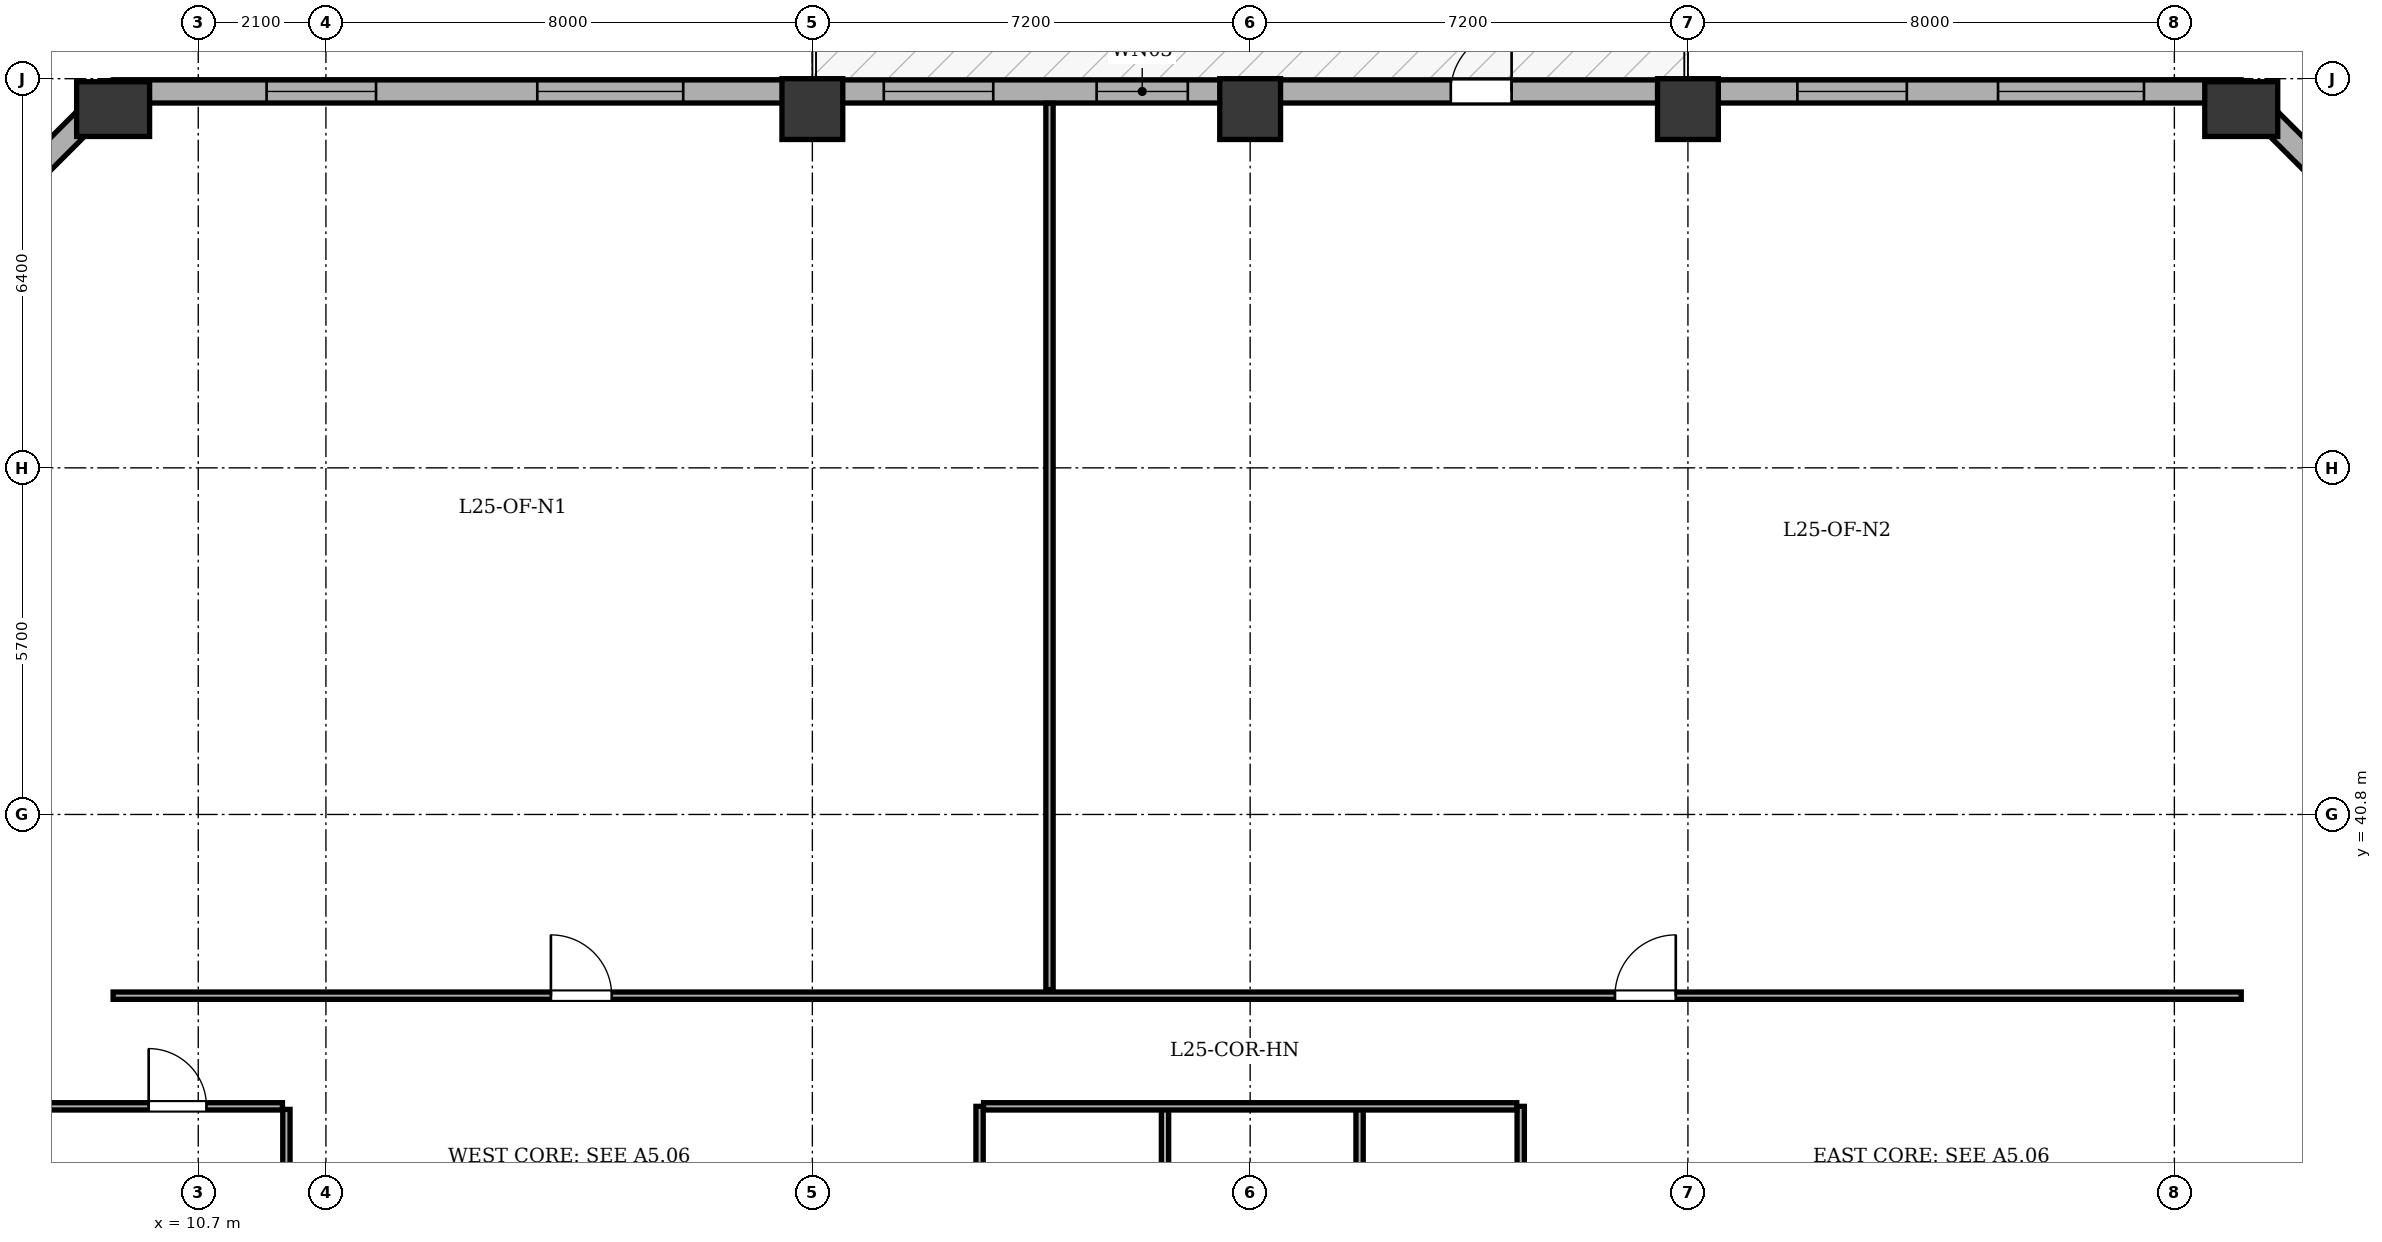
"""IFC4 building model, lengths in metres.
Left out: names, types, materials, properties, quantities, classifications, styles, units other than length and angle.
Written with IfcOpenShell. Run it as: python <this file> out.ifc"""

import sys

from ifc_helpers import new_model, si_unit, direction, frame, frame_2d, origin, origin_2d, place, context, subcontext, project, spatial, rectangle, extrude, element, fill, save


model = new_model("IFC4")
c1 = context("Model", 3, precision=1e-05, world=origin(), true_north=direction((0.0, 1.0)))
c2 = subcontext(c1, "Body", "Model", "MODEL_VIEW")
j1 = project(units=[si_unit("LENGTHUNIT", "METRE"), si_unit("PLANEANGLEUNIT", "RADIAN")], contexts=[c1])
p1 = place(None, origin())
s1 = spatial("IfcSite", under=j1, at=p1, CompositionType="ELEMENT")
p2 = place(p1, origin())
s2 = spatial("IfcBuilding", under=s1, at=p2, CompositionType="ELEMENT")
p3 = place(p2, frame((0.0, 0.0, 102.3)))
s3 = spatial("IfcBuildingStorey", under=s2, at=p3, CompositionType="ELEMENT", Elevation=102.3)
p4 = place(p3, frame((9.3, 52.4, 0.0), z_axis=(0.0, 0.0, 1.0), x_axis=(1.0, 0.0, 0.0)))
e1 = element("IfcColumn", 1, at=p4, inside=s3, PredefinedType="COLUMN", context=c2, shape_type="SweptSolid", body=[
    extrude(rectangle(XDim=0.9, YDim=1.2, at=origin_2d()), origin(), (0.0, 0.0, 1.0), 3.9),
])
for number, where, z_axis, x_axis in (
    (2, (20.8, 52.4, 0.0), (0.0, 0.0, 1.0), (1.0, 0.0, 0.0)),
    (3, (28.0, 52.4, 0.0), (0.0, 0.0, 1.0), (1.0, 0.0, 0.0)),
    (4, (35.2, 52.4, 0.0), (0.0, 0.0, 1.0), (1.0, 0.0, 0.0)),
):
    element("IfcColumn", number, at=place(p3, frame(where, z_axis=z_axis, x_axis=x_axis)), inside=s3, PredefinedType="COLUMN", context=c2, shape_type="SweptSolid", body=[
        extrude(rectangle(XDim=1.0, YDim=1.0, at=origin_2d()), origin(), (0.0, 0.0, 1.0), 3.9),
    ])
p5 = place(p3, frame((44.3, 52.4, 0.0), z_axis=(0.0, 0.0, 1.0), x_axis=(1.0, 0.0, 0.0)))
e5 = element("IfcColumn", 5, at=p5, inside=s3, PredefinedType="COLUMN", context=c2, shape_type="SweptSolid", body=[
    extrude(rectangle(XDim=0.9, YDim=1.2, at=origin_2d()), origin(), (0.0, 0.0, 1.0), 3.9),
])
p6 = place(p3, frame((4.51, 47.9, 0.0), z_axis=(0.0, 0.0, 1.0), x_axis=(0.707106781187, 0.707106781187, 0.0)))
e6 = element("IfcWall", 6, at=p6, inside=s3, PredefinedType="STANDARD", context=c2, shape_type="SweptSolid", body=[
    extrude(rectangle(XDim=6.774, YDim=0.38, at=frame_2d((3.387, 0.0))), origin(), (0.0, 0.0, 1.0), 3.135),
])
p7 = place(p6, frame((2.687, 0.0, 0.8)))
e7 = element("IfcOpeningElement", 7, at=p7, cuts=e6, PredefinedType="OPENING", context=c2, shape_type="SweptSolid", body=[
    extrude(rectangle(XDim=1.4, YDim=1.65, at=frame_2d((0.7, 0.825))), frame((0.0, 0.2, 0.0), z_axis=(0.0, -1.0, 0.0), x_axis=(1.0, 0.0, 0.0)), (0.0, 0.0, 1.0), 0.4),
])
p8 = place(p3, frame((9.3, 52.69, 0.0), z_axis=(0.0, 0.0, 1.0), x_axis=(1.0, 0.0, 0.0)))
e8 = element("IfcWall", 8, at=p8, inside=s3, PredefinedType="STANDARD", context=c2, shape_type="SweptSolid", body=[
    extrude(rectangle(XDim=35.0, YDim=0.38, at=frame_2d((17.5, 0.0))), origin(), (0.0, 0.0, 1.0), 3.135),
])
p9 = place(p8, frame((22.0, 0.0, 0.0)))
e9 = element("IfcOpeningElement", 9, at=p9, cuts=e8, PredefinedType="OPENING", context=c2, shape_type="SweptSolid", body=[
    extrude(rectangle(XDim=1.0, YDim=2.02, at=frame_2d((0.5, 1.01))), frame((0.0, 0.2, 0.0), z_axis=(0.0, -1.0, 0.0), x_axis=(1.0, 0.0, 0.0)), (0.0, 0.0, 1.0), 0.4),
])
p10 = place(p8, frame((2.524, 0.0, 0.8)))
e10 = element("IfcOpeningElement", 10, at=p10, cuts=e8, PredefinedType="OPENING", context=c2, shape_type="SweptSolid", body=[
    extrude(rectangle(XDim=1.8, YDim=1.9, at=frame_2d((0.9, 0.95))), frame((0.0, 0.2, 0.0), z_axis=(0.0, -1.0, 0.0), x_axis=(1.0, 0.0, 0.0)), (0.0, 0.0, 1.0), 0.4),
])
p11 = place(p8, frame((6.976, 0.0, 0.8)))
e11 = element("IfcOpeningElement", 11, at=p11, cuts=e8, PredefinedType="OPENING", context=c2, shape_type="SweptSolid", body=[
    extrude(rectangle(XDim=2.4, YDim=1.9, at=frame_2d((1.2, 0.95))), frame((0.0, 0.2, 0.0), z_axis=(0.0, -1.0, 0.0), x_axis=(1.0, 0.0, 0.0)), (0.0, 0.0, 1.0), 0.4),
])
p12 = place(p8, frame((12.675, 0.0, 0.8)))
e12 = element("IfcOpeningElement", 12, at=p12, cuts=e8, PredefinedType="OPENING", context=c2, shape_type="SweptSolid", body=[
    extrude(rectangle(XDim=1.8, YDim=1.9, at=frame_2d((0.9, 0.95))), frame((0.0, 0.2, 0.0), z_axis=(0.0, -1.0, 0.0), x_axis=(1.0, 0.0, 0.0)), (0.0, 0.0, 1.0), 0.4),
])
p13 = place(p8, frame((16.175, 0.0, 0.8)))
e13 = element("IfcOpeningElement", 13, at=p13, cuts=e8, PredefinedType="OPENING", context=c2, shape_type="SweptSolid", body=[
    extrude(rectangle(XDim=1.5, YDim=1.9, at=frame_2d((0.75, 0.95))), frame((0.0, 0.2, 0.0), z_axis=(0.0, -1.0, 0.0), x_axis=(1.0, 0.0, 0.0)), (0.0, 0.0, 1.0), 0.4),
])
p14 = place(p8, frame((27.7, 0.0, 0.8)))
e14 = element("IfcOpeningElement", 14, at=p14, cuts=e8, PredefinedType="OPENING", context=c2, shape_type="SweptSolid", body=[
    extrude(rectangle(XDim=1.8, YDim=1.9, at=frame_2d((0.9, 0.95))), frame((0.0, 0.2, 0.0), z_axis=(0.0, -1.0, 0.0), x_axis=(1.0, 0.0, 0.0)), (0.0, 0.0, 1.0), 0.4),
])
p15 = place(p8, frame((31.0, 0.0, 0.8)))
e15 = element("IfcOpeningElement", 15, at=p15, cuts=e8, PredefinedType="OPENING", context=c2, shape_type="SweptSolid", body=[
    extrude(rectangle(XDim=2.4, YDim=1.9, at=frame_2d((1.2, 0.95))), frame((0.0, 0.2, 0.0), z_axis=(0.0, -1.0, 0.0), x_axis=(1.0, 0.0, 0.0)), (0.0, 0.0, 1.0), 0.4),
])
p16 = place(p3, frame((44.3, 52.69, 0.0), z_axis=(0.0, 0.0, 1.0), x_axis=(0.707106781187, -0.707106781187, 0.0)))
e16 = element("IfcWall", 16, at=p16, inside=s3, PredefinedType="STANDARD", context=c2, shape_type="SweptSolid", body=[
    extrude(rectangle(XDim=6.774, YDim=0.38, at=frame_2d((3.387, 0.0))), origin(), (0.0, 0.0, 1.0), 3.135),
])
p17 = place(p16, frame((2.687, 0.0, 0.8)))
e17 = element("IfcOpeningElement", 17, at=p17, cuts=e16, PredefinedType="OPENING", context=c2, shape_type="SweptSolid", body=[
    extrude(rectangle(XDim=1.4, YDim=1.65, at=frame_2d((0.7, 0.825))), frame((0.0, 0.2, 0.0), z_axis=(0.0, -1.0, 0.0), x_axis=(1.0, 0.0, 0.0)), (0.0, 0.0, 1.0), 0.4),
])
for number, where, z_axis, x_axis in (
    (18, (23.55, 24.715, 0.0), (0.0, 0.0, 1.0), (0.0, 1.0, 0.0)),
    (19, (32.45, 24.715, 0.0), (0.0, 0.0, 1.0), (0.0, 1.0, 0.0)),
    (20, (26.6, 24.715, 0.0), (0.0, 0.0, 1.0), (0.0, 1.0, 0.0)),
):
    element("IfcWall", number, at=place(p3, frame(where, z_axis=z_axis, x_axis=x_axis)), inside=s3, PredefinedType="PARTITIONING", context=c2, shape_type="SweptSolid", body=[
        extrude(rectangle(XDim=11.285, YDim=0.12, at=frame_2d((5.643, 0.0))), origin(), (0.0, 0.0, 1.0), 3.6),
    ])
p18 = place(p3, frame((29.8, 24.715, 0.0), z_axis=(0.0, 0.0, 1.0), x_axis=(0.0, 1.0, 0.0)))
e21 = element("IfcWall", 21, at=p18, inside=s3, PredefinedType="PARTITIONING", context=c2, shape_type="SweptSolid", body=[
    extrude(rectangle(XDim=11.285, YDim=0.12, at=frame_2d((5.643, 0.0))), origin(), (0.0, 0.0, 1.0), 3.135),
])
p19 = place(p3, frame((23.615, 36.0, 0.0), z_axis=(0.0, 0.0, 1.0), x_axis=(1.0, 0.0, 0.0)))
e22 = element("IfcWall", 22, at=p19, inside=s3, PredefinedType="PARTITIONING", context=c2, shape_type="SweptSolid", body=[
    extrude(rectangle(XDim=8.77, YDim=0.12, at=frame_2d((4.385, 0.0))), origin(), (0.0, 0.0, 1.0), 3.6),
])
p20 = place(p3, frame((9.3, 37.82, 0.0), z_axis=(0.0, 0.0, 1.0), x_axis=(1.0, 0.0, 0.0)))
e23 = element("IfcWall", 23, at=p20, inside=s3, PredefinedType="PARTITIONING", context=c2, shape_type="SweptSolid", body=[
    extrude(rectangle(XDim=35.0, YDim=0.12, at=frame_2d((17.5, 0.0))), origin(), (0.0, 0.0, 1.0), 3.6),
])
p21 = place(p20, frame((7.2, 0.0, 0.0)))
e24 = element("IfcOpeningElement", 24, at=p21, cuts=e23, PredefinedType="OPENING", context=c2, shape_type="SweptSolid", body=[
    extrude(rectangle(XDim=1.0, YDim=2.1, at=frame_2d((0.5, 1.05))), frame((0.0, 0.07, 0.0), z_axis=(0.0, -1.0, 0.0), x_axis=(1.0, 0.0, 0.0)), (0.0, 0.0, 1.0), 0.14),
])
p22 = place(p20, frame((24.7, 0.0, 0.0)))
e25 = element("IfcOpeningElement", 25, at=p22, cuts=e23, PredefinedType="OPENING", context=c2, shape_type="SweptSolid", body=[
    extrude(rectangle(XDim=1.0, YDim=2.1, at=frame_2d((0.5, 1.05))), frame((0.0, 0.07, 0.0), z_axis=(0.0, -1.0, 0.0), x_axis=(1.0, 0.0, 0.0)), (0.0, 0.0, 1.0), 0.14),
])
p23 = place(p3, frame((24.7, 37.92, 0.0), z_axis=(0.0, 0.0, 1.0), x_axis=(0.0, 1.0, 0.0)))
e26 = element("IfcWall", 26, at=p23, inside=s3, PredefinedType="PARTITIONING", context=c2, shape_type="SweptSolid", body=[
    extrude(rectangle(XDim=14.575, YDim=0.12, at=frame_2d((7.288, 0.0))), origin(), (0.0, 0.0, 1.0), 3.6),
])
p24 = place(p3, frame((12.15, 18.45, 0.0), z_axis=(0.0, 0.0, 1.0), x_axis=(0.0, 1.0, 0.0)))
e27 = element("IfcWall", 27, at=p24, inside=s3, PredefinedType="PARTITIONING", context=c2, shape_type="SweptSolid", body=[
    extrude(rectangle(XDim=17.5, YDim=0.12, at=frame_2d((8.75, 0.0))), origin(), (0.0, 0.0, 1.0), 3.6),
])
p25 = place(p3, frame((4.705, 36.0, 0.0), z_axis=(0.0, 0.0, 1.0), x_axis=(1.0, 0.0, 0.0)))
e28 = element("IfcWall", 28, at=p25, inside=s3, PredefinedType="PARTITIONING", context=c2, shape_type="SweptSolid", body=[
    extrude(rectangle(XDim=7.38, YDim=0.12, at=frame_2d((3.69, 0.0))), origin(), (0.0, 0.0, 1.0), 3.6),
])
p26 = place(p25, frame((5.18, 0.0, 0.0)))
e29 = element("IfcOpeningElement", 29, at=p26, cuts=e28, PredefinedType="OPENING", context=c2, shape_type="SweptSolid", body=[
    extrude(rectangle(XDim=0.95, YDim=2.1, at=frame_2d((0.475, 1.05))), frame((0.0, 0.07, 0.0), z_axis=(0.0, -1.0, 0.0), x_axis=(1.0, 0.0, 0.0)), (0.0, 0.0, 1.0), 0.14),
])
p27 = place(p9, origin())
e30 = element("IfcDoor", 30, at=p27, inside=s3, OperationType="SINGLE_SWING_RIGHT", PredefinedType="DOOR", context=c2, shape_type="SweptSolid", body=[
    extrude(rectangle(XDim=1.0, YDim=2.02, at=frame_2d((0.5, 1.01))), frame((0.0, 0.025, 0.0), z_axis=(0.0, -1.0, 0.0), x_axis=(1.0, 0.0, 0.0)), (0.0, 0.0, 1.0), 0.05),
])
fill(e9, e30)
p28 = place(p10, origin())
e31 = element("IfcWindow", 31, at=p28, inside=s3, PartitioningType="SINGLE_PANEL", PredefinedType="WINDOW", context=c2, shape_type="SweptSolid", body=[
    extrude(rectangle(XDim=1.8, YDim=1.9, at=frame_2d((0.9, 0.95))), frame((0.0, -0.01, 0.0), z_axis=(0.0, -1.0, 0.0), x_axis=(1.0, 0.0, 0.0)), (0.0, 0.0, 1.0), 0.06),
])
fill(e10, e31)
p29 = place(p11, origin())
e32 = element("IfcWindow", 32, at=p29, inside=s3, PartitioningType="SINGLE_PANEL", PredefinedType="WINDOW", context=c2, shape_type="SweptSolid", body=[
    extrude(rectangle(XDim=2.4, YDim=1.9, at=frame_2d((1.2, 0.95))), frame((0.0, -0.01, 0.0), z_axis=(0.0, -1.0, 0.0), x_axis=(1.0, 0.0, 0.0)), (0.0, 0.0, 1.0), 0.06),
])
fill(e11, e32)
p30 = place(p12, origin())
e33 = element("IfcWindow", 33, at=p30, inside=s3, PartitioningType="SINGLE_PANEL", PredefinedType="WINDOW", context=c2, shape_type="SweptSolid", body=[
    extrude(rectangle(XDim=1.8, YDim=1.9, at=frame_2d((0.9, 0.95))), frame((0.0, -0.01, 0.0), z_axis=(0.0, -1.0, 0.0), x_axis=(1.0, 0.0, 0.0)), (0.0, 0.0, 1.0), 0.06),
])
fill(e12, e33)
p31 = place(p13, origin())
e34 = element("IfcWindow", 34, at=p31, inside=s3, PartitioningType="SINGLE_PANEL", PredefinedType="WINDOW", context=c2, shape_type="SweptSolid", body=[
    extrude(rectangle(XDim=1.5, YDim=1.9, at=frame_2d((0.75, 0.95))), frame((0.0, -0.01, 0.0), z_axis=(0.0, -1.0, 0.0), x_axis=(1.0, 0.0, 0.0)), (0.0, 0.0, 1.0), 0.06),
])
fill(e13, e34)
p32 = place(p14, origin())
e35 = element("IfcWindow", 35, at=p32, inside=s3, PartitioningType="SINGLE_PANEL", PredefinedType="WINDOW", context=c2, shape_type="SweptSolid", body=[
    extrude(rectangle(XDim=1.8, YDim=1.9, at=frame_2d((0.9, 0.95))), frame((0.0, -0.01, 0.0), z_axis=(0.0, -1.0, 0.0), x_axis=(1.0, 0.0, 0.0)), (0.0, 0.0, 1.0), 0.06),
])
fill(e14, e35)
p33 = place(p15, origin())
e36 = element("IfcWindow", 36, at=p33, inside=s3, PartitioningType="SINGLE_PANEL", PredefinedType="WINDOW", context=c2, shape_type="SweptSolid", body=[
    extrude(rectangle(XDim=2.4, YDim=1.9, at=frame_2d((1.2, 0.95))), frame((0.0, -0.01, 0.0), z_axis=(0.0, -1.0, 0.0), x_axis=(1.0, 0.0, 0.0)), (0.0, 0.0, 1.0), 0.06),
])
fill(e15, e36)
p34 = place(p21, origin())
e37 = element("IfcDoor", 37, at=p34, inside=s3, OperationType="SINGLE_SWING_LEFT", PredefinedType="DOOR", context=c2, shape_type="SweptSolid", body=[
    extrude(rectangle(XDim=1.0, YDim=2.1, at=frame_2d((0.5, 1.05))), frame((0.0, 0.025, 0.0), z_axis=(0.0, -1.0, 0.0), x_axis=(1.0, 0.0, 0.0)), (0.0, 0.0, 1.0), 0.05),
])
fill(e24, e37)
p35 = place(p22, origin())
e38 = element("IfcDoor", 38, at=p35, inside=s3, OperationType="SINGLE_SWING_RIGHT", PredefinedType="DOOR", context=c2, shape_type="SweptSolid", body=[
    extrude(rectangle(XDim=1.0, YDim=2.1, at=frame_2d((0.5, 1.05))), frame((0.0, 0.025, 0.0), z_axis=(0.0, -1.0, 0.0), x_axis=(1.0, 0.0, 0.0)), (0.0, 0.0, 1.0), 0.05),
])
fill(e25, e38)
p36 = place(p26, origin())
e39 = element("IfcDoor", 39, at=p36, inside=s3, OperationType="SINGLE_SWING_LEFT", PredefinedType="DOOR", context=c2, shape_type="SweptSolid", body=[
    extrude(rectangle(XDim=0.95, YDim=2.1, at=frame_2d((0.475, 1.05))), frame((0.0, 0.025, 0.0), z_axis=(0.0, -1.0, 0.0), x_axis=(1.0, 0.0, 0.0)), (0.0, 0.0, 1.0), 0.05),
])
fill(e29, e39)
save(model, sys.argv[1])
